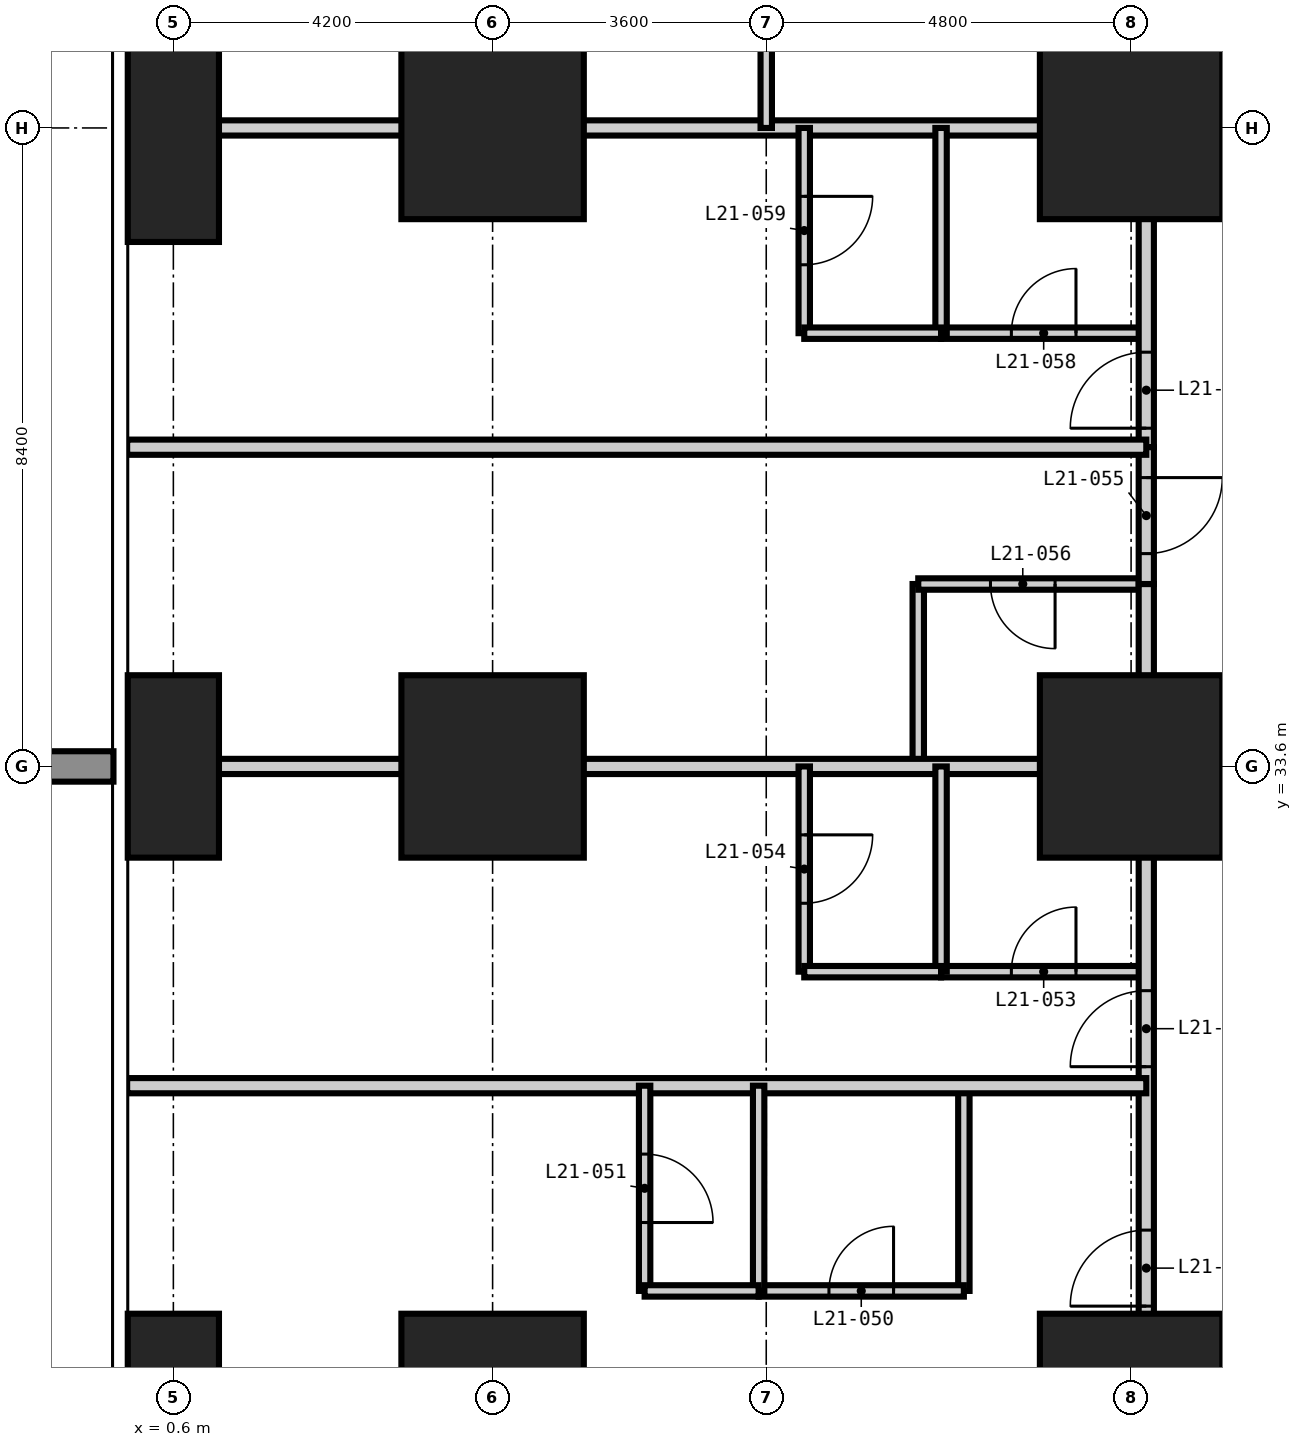
"""IFC4 building model, lengths in metres.
Left out: names, types, materials, properties, quantities, classifications, styles, units other than length and angle.
Written with IfcOpenShell. Run it as: python <this file> out.ifc"""

import sys

from ifc_helpers import new_model, si_unit, direction, frame, frame_2d, origin, origin_2d, place, context, subcontext, project, spatial, rectangle, extrude, element, fill, save


model = new_model("IFC4")
c1 = context("Model", 3, precision=1e-05, world=origin(), true_north=direction((0.0, 1.0)))
c2 = subcontext(c1, "Body", "Model", "MODEL_VIEW")
j1 = project(units=[si_unit("LENGTHUNIT", "METRE"), si_unit("PLANEANGLEUNIT", "RADIAN")], contexts=[c1])
p1 = place(None, origin())
s1 = spatial("IfcSite", under=j1, at=p1, CompositionType="ELEMENT")
p2 = place(p1, origin())
s2 = spatial("IfcBuilding", under=s1, at=p2, CompositionType="ELEMENT")
p3 = place(p2, frame((0.0, 0.0, 84.6)))
s3 = spatial("IfcBuildingStorey", under=s2, at=p3, CompositionType="ELEMENT", Elevation=84.6)
for number, where, z_axis, x_axis in (
    (1, (0.6, 25.2, -0.35), (0.0, 0.0, 1.0), (1.0, 0.0, 0.0)),
    (2, (0.6, 33.6, -0.35), (0.0, 0.0, 1.0), (1.0, 0.0, 0.0)),
):
    element("IfcColumn", number, at=place(p3, frame(where, z_axis=z_axis, x_axis=x_axis)), inside=s3, PredefinedType="COLUMN", context=c2, shape_type="SweptSolid", body=[
        extrude(rectangle(XDim=1.2, YDim=2.4, at=origin_2d()), origin(), (0.0, 0.0, 1.0), 3.55),
    ])
p4 = place(p3, frame((0.6, 42.0, -0.35), z_axis=(0.0, 0.0, 1.0), x_axis=(1.0, 0.0, 0.0)))
e3 = element("IfcColumn", 3, at=p4, inside=s3, PredefinedType="COLUMN", context=c2, shape_type="SweptSolid", body=[
    extrude(rectangle(XDim=1.2, YDim=3.0, at=origin_2d()), origin(), (0.0, 0.0, 1.0), 3.55),
])
for number, where, z_axis, x_axis in (
    (4, (4.8, 25.2, -0.35), (0.0, 0.0, 1.0), (1.0, 0.0, 0.0)),
    (5, (4.8, 33.6, -0.35), (0.0, 0.0, 1.0), (1.0, 0.0, 0.0)),
    (6, (4.8, 42.0, -0.35), (0.0, 0.0, 1.0), (1.0, 0.0, 0.0)),
    (7, (13.2, 25.2, -0.35), (0.0, 0.0, 1.0), (1.0, 0.0, 0.0)),
    (8, (13.2, 33.6, -0.35), (0.0, 0.0, 1.0), (1.0, 0.0, 0.0)),
    (9, (13.2, 42.0, -0.35), (0.0, 0.0, 1.0), (1.0, 0.0, 0.0)),
):
    element("IfcColumn", number, at=place(p3, frame(where, z_axis=z_axis, x_axis=x_axis)), inside=s3, PredefinedType="COLUMN", context=c2, shape_type="SweptSolid", body=[
        extrude(rectangle(XDim=2.4, YDim=2.4, at=origin_2d()), origin(), (0.0, 0.0, 1.0), 3.55),
    ])
p5 = place(p3, frame((10.4, 33.6, 0.0), z_axis=(0.0, 0.0, 1.0), x_axis=(0.0, 1.0, 0.0)))
e10 = element("IfcWall", 10, at=p5, inside=s3, PredefinedType="PARTITIONING", context=c2, shape_type="SweptSolid", body=[
    extrude(rectangle(XDim=2.4, YDim=0.15, at=frame_2d((1.2, 0.0))), origin(), (0.0, 0.0, 1.0), 3.2),
])
p6 = place(p3, frame((11.0, 26.7, 0.0), z_axis=(0.0, 0.0, 1.0), x_axis=(0.0, 1.0, 0.0)))
e11 = element("IfcWall", 11, at=p6, inside=s3, PredefinedType="PARTITIONING", context=c2, shape_type="SweptSolid", body=[
    extrude(rectangle(XDim=2.7, YDim=0.15, at=frame_2d((1.35, 0.0))), origin(), (0.0, 0.0, 1.0), 3.2),
])
p7 = place(p3, frame((8.3, 26.7, 0.0), z_axis=(0.0, 0.0, 1.0), x_axis=(1.0, 0.0, 0.0)))
e12 = element("IfcWall", 12, at=p7, inside=s3, PredefinedType="PARTITIONING", context=c2, shape_type="SweptSolid", body=[
    extrude(rectangle(XDim=2.7, YDim=0.15, at=frame_2d((1.35, 0.0))), origin(), (0.0, 0.0, 1.0), 3.2),
])
p8 = place(p7, frame((0.925, 0.0, 0.0)))
e13 = element("IfcOpeningElement", 13, at=p8, cuts=e12, PredefinedType="OPENING", context=c2, shape_type="SweptSolid", body=[
    extrude(rectangle(XDim=0.85, YDim=2.1, at=frame_2d((0.425, 1.05))), frame((0.0, 0.085, 0.0), z_axis=(0.0, -1.0, 0.0), x_axis=(1.0, 0.0, 0.0)), (0.0, 0.0, 1.0), 0.17),
])
p9 = place(p3, frame((10.7, 30.9, 0.0), z_axis=(0.0, 0.0, 1.0), x_axis=(1.0, 0.0, 0.0)))
e14 = element("IfcWall", 14, at=p9, inside=s3, PredefinedType="PARTITIONING", context=c2, shape_type="SweptSolid", body=[
    extrude(rectangle(XDim=2.7, YDim=0.15, at=frame_2d((1.35, 0.0))), origin(), (0.0, 0.0, 1.0), 3.2),
])
p10 = place(p9, frame((0.925, 0.0, 0.0)))
e15 = element("IfcOpeningElement", 15, at=p10, cuts=e14, PredefinedType="OPENING", context=c2, shape_type="SweptSolid", body=[
    extrude(rectangle(XDim=0.85, YDim=2.1, at=frame_2d((0.425, 1.05))), frame((0.0, 0.085, 0.0), z_axis=(0.0, -1.0, 0.0), x_axis=(1.0, 0.0, 0.0)), (0.0, 0.0, 1.0), 0.17),
])
p11 = place(p3, frame((10.4, 36.0, 0.0), z_axis=(0.0, 0.0, 1.0), x_axis=(1.0, 0.0, 0.0)))
e16 = element("IfcWall", 16, at=p11, inside=s3, PredefinedType="PARTITIONING", context=c2, shape_type="SweptSolid", body=[
    extrude(rectangle(XDim=3.0, YDim=0.15, at=frame_2d((1.5, 0.0))), origin(), (0.0, 0.0, 1.0), 3.2),
])
p12 = place(p11, frame((0.95, 0.0, 0.0)))
e17 = element("IfcOpeningElement", 17, at=p12, cuts=e16, PredefinedType="OPENING", context=c2, shape_type="SweptSolid", body=[
    extrude(rectangle(XDim=0.85, YDim=2.1, at=frame_2d((0.425, 1.05))), frame((0.0, 0.085, 0.0), z_axis=(0.0, -1.0, 0.0), x_axis=(1.0, 0.0, 0.0)), (0.0, 0.0, 1.0), 0.17),
])
p13 = place(p3, frame((10.7, 39.3, 0.0), z_axis=(0.0, 0.0, 1.0), x_axis=(1.0, 0.0, 0.0)))
e18 = element("IfcWall", 18, at=p13, inside=s3, PredefinedType="PARTITIONING", context=c2, shape_type="SweptSolid", body=[
    extrude(rectangle(XDim=2.7, YDim=0.15, at=frame_2d((1.35, 0.0))), origin(), (0.0, 0.0, 1.0), 3.2),
])
p14 = place(p13, frame((0.925, 0.0, 0.0)))
e19 = element("IfcOpeningElement", 19, at=p14, cuts=e18, PredefinedType="OPENING", context=c2, shape_type="SweptSolid", body=[
    extrude(rectangle(XDim=0.85, YDim=2.1, at=frame_2d((0.425, 1.05))), frame((0.0, 0.085, 0.0), z_axis=(0.0, -1.0, 0.0), x_axis=(1.0, 0.0, 0.0)), (0.0, 0.0, 1.0), 0.17),
])
p15 = place(p3, frame((13.4, 13.4, 0.0), z_axis=(0.0, 0.0, 1.0), x_axis=(0.0, 1.0, 0.0)))
e20 = element("IfcWall", 20, at=p15, inside=s3, PredefinedType="PARTITIONING", context=c2, shape_type="SweptSolid", body=[
    extrude(rectangle(XDim=22.6, YDim=0.2, at=frame_2d((11.3, 0.0))), origin(), (0.0, 0.0, 1.0), 3.2),
])
p16 = place(p15, frame((6.35, 0.0, 0.0)))
e21 = element("IfcOpeningElement", 21, at=p16, cuts=e20, PredefinedType="OPENING", context=c2, shape_type="SweptSolid", body=[
    extrude(rectangle(XDim=1.0, YDim=2.2, at=frame_2d((0.5, 1.1))), frame((0.0, 0.11, 0.0), z_axis=(0.0, -1.0, 0.0), x_axis=(1.0, 0.0, 0.0)), (0.0, 0.0, 1.0), 0.22),
])
p17 = place(p15, frame((13.1, 0.0, 0.0)))
e22 = element("IfcOpeningElement", 22, at=p17, cuts=e20, PredefinedType="OPENING", context=c2, shape_type="SweptSolid", body=[
    extrude(rectangle(XDim=1.0, YDim=2.2, at=frame_2d((0.5, 1.1))), frame((0.0, 0.11, 0.0), z_axis=(0.0, -1.0, 0.0), x_axis=(1.0, 0.0, 0.0)), (0.0, 0.0, 1.0), 0.22),
])
p18 = place(p15, frame((16.25, 0.0, 0.0)))
e23 = element("IfcOpeningElement", 23, at=p18, cuts=e20, PredefinedType="OPENING", context=c2, shape_type="SweptSolid", body=[
    extrude(rectangle(XDim=1.0, YDim=2.2, at=frame_2d((0.5, 1.1))), frame((0.0, 0.11, 0.0), z_axis=(0.0, -1.0, 0.0), x_axis=(1.0, 0.0, 0.0)), (0.0, 0.0, 1.0), 0.22),
])
p19 = place(p15, frame((1.1, 0.0, 0.0)))
e24 = element("IfcOpeningElement", 24, at=p19, cuts=e20, PredefinedType="OPENING", context=c2, shape_type="SweptSolid", body=[
    extrude(rectangle(XDim=1.0, YDim=2.2, at=frame_2d((0.5, 1.1))), frame((0.0, 0.11, 0.0), z_axis=(0.0, -1.0, 0.0), x_axis=(1.0, 0.0, 0.0)), (0.0, 0.0, 1.0), 0.22),
])
p20 = place(p3, frame((13.4, 37.8, 0.0), z_axis=(0.0, 0.0, 1.0), x_axis=(0.0, 1.0, 0.0)))
e25 = element("IfcWall", 25, at=p20, inside=s3, PredefinedType="PARTITIONING", context=c2, shape_type="SweptSolid", body=[
    extrude(rectangle(XDim=7.0, YDim=0.2, at=frame_2d((3.5, 0.0))), origin(), (0.0, 0.0, 1.0), 3.2),
])
p21 = place(p20, frame((0.25, 0.0, 0.0)))
e26 = element("IfcOpeningElement", 26, at=p21, cuts=e25, PredefinedType="OPENING", context=c2, shape_type="SweptSolid", body=[
    extrude(rectangle(XDim=1.0, YDim=2.2, at=frame_2d((0.5, 1.1))), frame((0.0, 0.11, 0.0), z_axis=(0.0, -1.0, 0.0), x_axis=(1.0, 0.0, 0.0)), (0.0, 0.0, 1.0), 0.22),
])
p22 = place(p20, frame((5.5, 0.0, 0.0)))
e27 = element("IfcOpeningElement", 27, at=p22, cuts=e25, PredefinedType="OPENING", context=c2, shape_type="SweptSolid", body=[
    extrude(rectangle(XDim=1.0, YDim=2.2, at=frame_2d((0.5, 1.1))), frame((0.0, 0.11, 0.0), z_axis=(0.0, -1.0, 0.0), x_axis=(1.0, 0.0, 0.0)), (0.0, 0.0, 1.0), 0.22),
])
p23 = place(p3, frame((13.4, 37.8, 0.0), z_axis=(0.0, 0.0, 1.0), x_axis=(0.0, -1.0, 0.0)))
e28 = element("IfcWall", 28, at=p23, inside=s3, PredefinedType="PARTITIONING", context=c2, shape_type="SweptSolid", body=[
    extrude(rectangle(XDim=1.8, YDim=0.2, at=frame_2d((0.9, 0.0))), origin(), (0.0, 0.0, 1.0), 3.2),
])
p24 = place(p23, frame((0.4, 0.0, 0.0)))
e29 = element("IfcOpeningElement", 29, at=p24, cuts=e28, PredefinedType="OPENING", context=c2, shape_type="SweptSolid", body=[
    extrude(rectangle(XDim=1.0, YDim=2.2, at=frame_2d((0.5, 1.1))), frame((0.0, 0.11, 0.0), z_axis=(0.0, -1.0, 0.0), x_axis=(1.0, 0.0, 0.0)), (0.0, 0.0, 1.0), 0.22),
])
for number, where, z_axis, x_axis in (
    (30, (-0.008, 29.4, 0.0), (0.0, 0.0, 1.0), (1.0, 0.0, 0.0)),
    (31, (-0.008, 33.6, 0.0), (0.0, 0.0, 1.0), (1.0, 0.0, 0.0)),
    (32, (-0.008, 37.8, 0.0), (0.0, 0.0, 1.0), (1.0, 0.0, 0.0)),
    (33, (-0.008, 42.0, 0.0), (0.0, 0.0, 1.0), (1.0, 0.0, 0.0)),
):
    element("IfcWall", number, at=place(p3, frame(where, z_axis=z_axis, x_axis=x_axis)), inside=s3, PredefinedType="PARTITIONING", context=c2, shape_type="SweptSolid", body=[
        extrude(rectangle(XDim=13.408, YDim=0.2, at=frame_2d((6.704, 0.0))), origin(), (0.0, 0.0, 1.0), 3.2),
    ])
p25 = place(p3, frame((6.8, 26.7, 0.0), z_axis=(0.0, 0.0, 1.0), x_axis=(0.0, 1.0, 0.0)))
e34 = element("IfcWall", 34, at=p25, inside=s3, PredefinedType="PARTITIONING", context=c2, shape_type="SweptSolid", body=[
    extrude(rectangle(XDim=2.7, YDim=0.15, at=frame_2d((1.35, 0.0))), origin(), (0.0, 0.0, 1.0), 3.2),
])
p26 = place(p25, frame((0.9, 0.0, 0.0)))
e35 = element("IfcOpeningElement", 35, at=p26, cuts=e34, PredefinedType="OPENING", context=c2, shape_type="SweptSolid", body=[
    extrude(rectangle(XDim=0.9, YDim=2.1, at=frame_2d((0.45, 1.05))), frame((0.0, 0.085, 0.0), z_axis=(0.0, -1.0, 0.0), x_axis=(1.0, 0.0, 0.0)), (0.0, 0.0, 1.0), 0.17),
])
p27 = place(p3, frame((8.3, 26.7, 0.0), z_axis=(0.0, 0.0, 1.0), x_axis=(0.0, 1.0, 0.0)))
e36 = element("IfcWall", 36, at=p27, inside=s3, PredefinedType="PARTITIONING", context=c2, shape_type="SweptSolid", body=[
    extrude(rectangle(XDim=2.7, YDim=0.15, at=frame_2d((1.35, 0.0))), origin(), (0.0, 0.0, 1.0), 3.2),
])
p28 = place(p3, frame((8.4, 42.0, 0.0), z_axis=(0.0, 0.0, 1.0), x_axis=(0.0, 1.0, 0.0)))
e37 = element("IfcWall", 37, at=p28, inside=s3, PredefinedType="PARTITIONING", context=c2, shape_type="SweptSolid", body=[
    extrude(rectangle(XDim=16.808, YDim=0.15, at=frame_2d((8.404, 0.0))), origin(), (0.0, 0.0, 1.0), 3.2),
])
p29 = place(p28, frame((13.95, 0.0, 0.0)))
e38 = element("IfcOpeningElement", 38, at=p29, cuts=e37, PredefinedType="OPENING", context=c2, shape_type="SweptSolid", body=[
    extrude(rectangle(XDim=0.9, YDim=2.1, at=frame_2d((0.45, 1.05))), frame((0.0, 0.085, 0.0), z_axis=(0.0, -1.0, 0.0), x_axis=(1.0, 0.0, 0.0)), (0.0, 0.0, 1.0), 0.17),
])
p30 = place(p28, frame((3.75, 0.0, 0.0)))
e39 = element("IfcOpeningElement", 39, at=p30, cuts=e37, PredefinedType="OPENING", context=c2, shape_type="SweptSolid", body=[
    extrude(rectangle(XDim=0.9, YDim=2.1, at=frame_2d((0.45, 1.05))), frame((0.0, 0.085, 0.0), z_axis=(0.0, -1.0, 0.0), x_axis=(1.0, 0.0, 0.0)), (0.0, 0.0, 1.0), 0.17),
])
p31 = place(p3, frame((8.9, 30.9, 0.0), z_axis=(0.0, 0.0, 1.0), x_axis=(0.0, 1.0, 0.0)))
e40 = element("IfcWall", 40, at=p31, inside=s3, PredefinedType="PARTITIONING", context=c2, shape_type="SweptSolid", body=[
    extrude(rectangle(XDim=2.7, YDim=0.15, at=frame_2d((1.35, 0.0))), origin(), (0.0, 0.0, 1.0), 3.2),
])
p32 = place(p31, frame((0.9, 0.0, 0.0)))
e41 = element("IfcOpeningElement", 41, at=p32, cuts=e40, PredefinedType="OPENING", context=c2, shape_type="SweptSolid", body=[
    extrude(rectangle(XDim=0.9, YDim=2.1, at=frame_2d((0.45, 1.05))), frame((0.0, 0.085, 0.0), z_axis=(0.0, -1.0, 0.0), x_axis=(1.0, 0.0, 0.0)), (0.0, 0.0, 1.0), 0.17),
])
p33 = place(p3, frame((8.9, 39.3, 0.0), z_axis=(0.0, 0.0, 1.0), x_axis=(0.0, 1.0, 0.0)))
e42 = element("IfcWall", 42, at=p33, inside=s3, PredefinedType="PARTITIONING", context=c2, shape_type="SweptSolid", body=[
    extrude(rectangle(XDim=2.7, YDim=0.15, at=frame_2d((1.35, 0.0))), origin(), (0.0, 0.0, 1.0), 3.2),
])
p34 = place(p33, frame((0.9, 0.0, 0.0)))
e43 = element("IfcOpeningElement", 43, at=p34, cuts=e42, PredefinedType="OPENING", context=c2, shape_type="SweptSolid", body=[
    extrude(rectangle(XDim=0.9, YDim=2.1, at=frame_2d((0.45, 1.05))), frame((0.0, 0.085, 0.0), z_axis=(0.0, -1.0, 0.0), x_axis=(1.0, 0.0, 0.0)), (0.0, 0.0, 1.0), 0.17),
])
p35 = place(p3, frame((10.7, 30.9, 0.0), z_axis=(0.0, 0.0, 1.0), x_axis=(0.0, 1.0, 0.0)))
e44 = element("IfcWall", 44, at=p35, inside=s3, PredefinedType="PARTITIONING", context=c2, shape_type="SweptSolid", body=[
    extrude(rectangle(XDim=2.7, YDim=0.15, at=frame_2d((1.35, 0.0))), origin(), (0.0, 0.0, 1.0), 3.2),
])
p36 = place(p3, frame((10.7, 39.3, 0.0), z_axis=(0.0, 0.0, 1.0), x_axis=(0.0, 1.0, 0.0)))
e45 = element("IfcWall", 45, at=p36, inside=s3, PredefinedType="PARTITIONING", context=c2, shape_type="SweptSolid", body=[
    extrude(rectangle(XDim=2.7, YDim=0.15, at=frame_2d((1.35, 0.0))), origin(), (0.0, 0.0, 1.0), 3.2),
])
p37 = place(p3, frame((6.8, 26.7, 0.0), z_axis=(0.0, 0.0, 1.0), x_axis=(1.0, 0.0, 0.0)))
e46 = element("IfcWall", 46, at=p37, inside=s3, PredefinedType="PARTITIONING", context=c2, shape_type="SweptSolid", body=[
    extrude(rectangle(XDim=1.5, YDim=0.15, at=frame_2d((0.75, 0.0))), origin(), (0.0, 0.0, 1.0), 3.2),
])
for number, where, z_axis, x_axis in (
    (47, (8.9, 30.9, 0.0), (0.0, 0.0, 1.0), (1.0, 0.0, 0.0)),
    (48, (8.9, 39.3, 0.0), (0.0, 0.0, 1.0), (1.0, 0.0, 0.0)),
):
    element("IfcWall", number, at=place(p3, frame(where, z_axis=z_axis, x_axis=x_axis)), inside=s3, PredefinedType="PARTITIONING", context=c2, shape_type="SweptSolid", body=[
        extrude(rectangle(XDim=1.8, YDim=0.15, at=frame_2d((0.9, 0.0))), origin(), (0.0, 0.0, 1.0), 3.2),
    ])
p38 = place(p17, origin())
e49 = element("IfcDoor", 49, at=p38, inside=s3, OperationType="SINGLE_SWING_LEFT", PredefinedType="DOOR", context=c2, shape_type="SweptSolid", body=[
    extrude(rectangle(XDim=1.0, YDim=2.2, at=frame_2d((0.5, 1.1))), frame((0.0, 0.025, 0.0), z_axis=(0.0, -1.0, 0.0), x_axis=(1.0, 0.0, 0.0)), (0.0, 0.0, 1.0), 0.05),
])
fill(e22, e49)
p39 = place(p8, origin())
e50 = element("IfcDoor", 50, at=p39, inside=s3, OperationType="SINGLE_SWING_RIGHT", PredefinedType="DOOR", context=c2, shape_type="SweptSolid", body=[
    extrude(rectangle(XDim=0.85, YDim=2.1, at=frame_2d((0.425, 1.05))), frame((0.0, 0.025, 0.0), z_axis=(0.0, -1.0, 0.0), x_axis=(1.0, 0.0, 0.0)), (0.0, 0.0, 1.0), 0.05),
])
fill(e13, e50)
p40 = place(p26, frame((0.9, 0.0, 0.0), z_axis=(0.0, 0.0, 1.0), x_axis=(-1.0, 0.0, 0.0)))
e51 = element("IfcDoor", 51, at=p40, inside=s3, OperationType="SINGLE_SWING_RIGHT", PredefinedType="DOOR", context=c2, shape_type="SweptSolid", body=[
    extrude(rectangle(XDim=0.9, YDim=2.1, at=frame_2d((0.45, 1.05))), frame((0.0, 0.025, 0.0), z_axis=(0.0, -1.0, 0.0), x_axis=(1.0, 0.0, 0.0)), (0.0, 0.0, 1.0), 0.05),
])
fill(e35, e51)
p41 = place(p18, origin())
e52 = element("IfcDoor", 52, at=p41, inside=s3, OperationType="SINGLE_SWING_LEFT", PredefinedType="DOOR", context=c2, shape_type="SweptSolid", body=[
    extrude(rectangle(XDim=1.0, YDim=2.2, at=frame_2d((0.5, 1.1))), frame((0.0, 0.025, 0.0), z_axis=(0.0, -1.0, 0.0), x_axis=(1.0, 0.0, 0.0)), (0.0, 0.0, 1.0), 0.05),
])
fill(e23, e52)
p42 = place(p10, origin())
e53 = element("IfcDoor", 53, at=p42, inside=s3, OperationType="SINGLE_SWING_RIGHT", PredefinedType="DOOR", context=c2, shape_type="SweptSolid", body=[
    extrude(rectangle(XDim=0.85, YDim=2.1, at=frame_2d((0.425, 1.05))), frame((0.0, 0.025, 0.0), z_axis=(0.0, -1.0, 0.0), x_axis=(1.0, 0.0, 0.0)), (0.0, 0.0, 1.0), 0.05),
])
fill(e15, e53)
p43 = place(p32, frame((0.9, 0.0, 0.0), z_axis=(0.0, 0.0, 1.0), x_axis=(-1.0, 0.0, 0.0)))
e54 = element("IfcDoor", 54, at=p43, inside=s3, OperationType="SINGLE_SWING_LEFT", PredefinedType="DOOR", context=c2, shape_type="SweptSolid", body=[
    extrude(rectangle(XDim=0.9, YDim=2.1, at=frame_2d((0.45, 1.05))), frame((0.0, 0.025, 0.0), z_axis=(0.0, -1.0, 0.0), x_axis=(1.0, 0.0, 0.0)), (0.0, 0.0, 1.0), 0.05),
])
fill(e41, e54)
p44 = place(p24, origin())
e55 = element("IfcDoor", 55, at=p44, inside=s3, OperationType="SINGLE_SWING_LEFT", PredefinedType="DOOR", context=c2, shape_type="SweptSolid", body=[
    extrude(rectangle(XDim=1.0, YDim=2.2, at=frame_2d((0.5, 1.1))), frame((0.0, 0.025, 0.0), z_axis=(0.0, -1.0, 0.0), x_axis=(1.0, 0.0, 0.0)), (0.0, 0.0, 1.0), 0.05),
])
fill(e29, e55)
p45 = place(p12, frame((0.85, 0.0, 0.0), z_axis=(0.0, 0.0, 1.0), x_axis=(-1.0, 0.0, 0.0)))
e56 = element("IfcDoor", 56, at=p45, inside=s3, OperationType="SINGLE_SWING_LEFT", PredefinedType="DOOR", context=c2, shape_type="SweptSolid", body=[
    extrude(rectangle(XDim=0.85, YDim=2.1, at=frame_2d((0.425, 1.05))), frame((0.0, 0.025, 0.0), z_axis=(0.0, -1.0, 0.0), x_axis=(1.0, 0.0, 0.0)), (0.0, 0.0, 1.0), 0.05),
])
fill(e17, e56)
p46 = place(p21, origin())
e57 = element("IfcDoor", 57, at=p46, inside=s3, OperationType="SINGLE_SWING_LEFT", PredefinedType="DOOR", context=c2, shape_type="SweptSolid", body=[
    extrude(rectangle(XDim=1.0, YDim=2.2, at=frame_2d((0.5, 1.1))), frame((0.0, 0.025, 0.0), z_axis=(0.0, -1.0, 0.0), x_axis=(1.0, 0.0, 0.0)), (0.0, 0.0, 1.0), 0.05),
])
fill(e26, e57)
p47 = place(p14, origin())
e58 = element("IfcDoor", 58, at=p47, inside=s3, OperationType="SINGLE_SWING_RIGHT", PredefinedType="DOOR", context=c2, shape_type="SweptSolid", body=[
    extrude(rectangle(XDim=0.85, YDim=2.1, at=frame_2d((0.425, 1.05))), frame((0.0, 0.025, 0.0), z_axis=(0.0, -1.0, 0.0), x_axis=(1.0, 0.0, 0.0)), (0.0, 0.0, 1.0), 0.05),
])
fill(e19, e58)
p48 = place(p34, frame((0.9, 0.0, 0.0), z_axis=(0.0, 0.0, 1.0), x_axis=(-1.0, 0.0, 0.0)))
e59 = element("IfcDoor", 59, at=p48, inside=s3, OperationType="SINGLE_SWING_LEFT", PredefinedType="DOOR", context=c2, shape_type="SweptSolid", body=[
    extrude(rectangle(XDim=0.9, YDim=2.1, at=frame_2d((0.45, 1.05))), frame((0.0, 0.025, 0.0), z_axis=(0.0, -1.0, 0.0), x_axis=(1.0, 0.0, 0.0)), (0.0, 0.0, 1.0), 0.05),
])
fill(e43, e59)
save(model, sys.argv[1])
